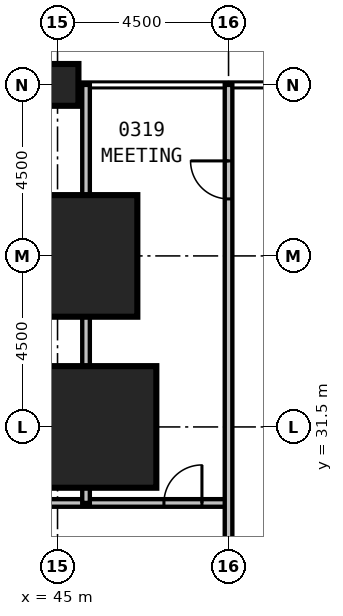
"""IFC4 building model, lengths in metres.
Left out: names, types, materials, properties, quantities, classifications, styles, units other than length and angle.
Written with IfcOpenShell. Run it as: python <this file> out.ifc"""

import sys

from ifc_helpers import new_model, si_unit, direction, frame, frame_2d, origin, origin_2d, place, context, subcontext, project, spatial, rectangle, extrude, element, fill, save


model = new_model("IFC4")
c1 = context("Model", 3, precision=1e-05, world=origin(), true_north=direction((0.0, 1.0)))
c2 = subcontext(c1, "Body", "Model", "MODEL_VIEW")
j1 = project(units=[si_unit("LENGTHUNIT", "METRE"), si_unit("PLANEANGLEUNIT", "RADIAN")], contexts=[c1])
p1 = place(None, origin())
s1 = spatial("IfcSite", under=j1, at=p1, CompositionType="ELEMENT")
p2 = place(p1, origin())
s2 = spatial("IfcBuilding", under=s1, at=p2, CompositionType="ELEMENT")
p3 = place(p2, frame((0.0, 0.0, 19.0)))
s3 = spatial("IfcBuildingStorey", under=s2, at=p3, CompositionType="ELEMENT", Elevation=19.0)
for number, where, z_axis, x_axis in (
    (1, (46.0, 31.5, 0.0), (0.0, 0.0, 1.0), (1.0, 0.0, 0.0)),
    (2, (45.5, 36.0, 0.0), (0.0, 0.0, 1.0), (1.0, 0.0, 0.0)),
):
    element("IfcColumn", number, at=place(p3, frame(where, z_axis=z_axis, x_axis=x_axis)), inside=s3, PredefinedType="COLUMN", context=c2, shape_type="SweptSolid", body=[
        extrude(rectangle(XDim=3.2, YDim=3.2, at=origin_2d()), origin(), (0.0, 0.0, 1.0), 5.0),
    ])
p4 = place(p3, frame((45.0, 40.5, 0.0), z_axis=(0.0, 0.0, 1.0), x_axis=(1.0, 0.0, 0.0)))
e3 = element("IfcColumn", 3, at=p4, inside=s3, PredefinedType="COLUMN", context=c2, shape_type="SweptSolid", body=[
    extrude(rectangle(XDim=1.1, YDim=1.1, at=origin_2d()), origin(), (0.0, 0.0, 1.0), 5.0),
])
p5 = place(p3, frame((49.5, 10.4, 0.0), z_axis=(0.0, 0.0, 1.0), x_axis=(0.0, 1.0, 0.0)))
e4 = element("IfcWall", 4, at=p5, inside=s3, PredefinedType="PARTITIONING", context=c2, shape_type="SweptSolid", body=[
    extrude(rectangle(XDim=30.1, YDim=0.2, at=frame_2d((15.05, 0.0))), origin(), (0.0, 0.0, 1.0), 4.7),
])
p6 = place(p5, frame((27.1, 0.0, 0.0)))
e5 = element("IfcOpeningElement", 5, at=p6, cuts=e4, PredefinedType="OPENING", context=c2, shape_type="SweptSolid", body=[
    extrude(rectangle(XDim=1.0, YDim=2.1, at=frame_2d((0.5, 1.05))), frame((0.0, 0.11, 0.0), z_axis=(0.0, -1.0, 0.0), x_axis=(1.0, 0.0, 0.0)), (0.0, 0.0, 1.0), 0.22),
])
p7 = place(p5, frame((4.8, 0.0, 0.0)))
e6 = element("IfcOpeningElement", 6, at=p7, cuts=e4, PredefinedType="OPENING", context=c2, shape_type="SweptSolid", body=[
    extrude(rectangle(XDim=1.2, YDim=2.1, at=frame_2d((0.6, 1.05))), frame((0.0, 0.11, 0.0), z_axis=(0.0, -1.0, 0.0), x_axis=(1.0, 0.0, 0.0)), (0.0, 0.0, 1.0), 0.22),
])
p8 = place(p3, frame((42.2, 29.5, 0.0), z_axis=(0.0, 0.0, 1.0), x_axis=(1.0, 0.0, 0.0)))
e7 = element("IfcWall", 7, at=p8, inside=s3, PredefinedType="PARTITIONING", context=c2, shape_type="SweptSolid", body=[
    extrude(rectangle(XDim=7.3, YDim=0.2, at=frame_2d((3.65, 0.0))), origin(), (0.0, 0.0, 1.0), 4.7),
])
p9 = place(p8, frame((0.5, 0.0, 0.0)))
e8 = element("IfcOpeningElement", 8, at=p9, cuts=e7, PredefinedType="OPENING", context=c2, shape_type="SweptSolid", body=[
    extrude(rectangle(XDim=1.0, YDim=2.1, at=frame_2d((0.5, 1.05))), frame((0.0, 0.11, 0.0), z_axis=(0.0, -1.0, 0.0), x_axis=(1.0, 0.0, 0.0)), (0.0, 0.0, 1.0), 0.22),
])
p10 = place(p8, frame((5.6, 0.0, 0.0)))
e9 = element("IfcOpeningElement", 9, at=p10, cuts=e7, PredefinedType="OPENING", context=c2, shape_type="SweptSolid", body=[
    extrude(rectangle(XDim=1.0, YDim=2.1, at=frame_2d((0.5, 1.05))), frame((0.0, 0.11, 0.0), z_axis=(0.0, -1.0, 0.0), x_axis=(1.0, 0.0, 0.0)), (0.0, 0.0, 1.0), 0.22),
])
p11 = place(p3, frame((45.75, 29.5, 0.0), z_axis=(0.0, 0.0, 1.0), x_axis=(0.0, 1.0, 0.0)))
e10 = element("IfcWall", 10, at=p11, inside=s3, PredefinedType="PARTITIONING", context=c2, shape_type="SweptSolid", body=[
    extrude(rectangle(XDim=0.4, YDim=0.2, at=frame_2d((0.2, 0.0))), origin(), (0.0, 0.0, 1.0), 4.7),
])
p12 = place(p3, frame((45.75, 33.1, 0.0), z_axis=(0.0, 0.0, 1.0), x_axis=(0.0, 1.0, 0.0)))
e11 = element("IfcWall", 11, at=p12, inside=s3, PredefinedType="PARTITIONING", context=c2, shape_type="SweptSolid", body=[
    extrude(rectangle(XDim=1.3, YDim=0.2, at=frame_2d((0.65, 0.0))), origin(), (0.0, 0.0, 1.0), 3.4),
])
p13 = place(p3, frame((45.75, 37.6, 0.0), z_axis=(0.0, 0.0, 1.0), x_axis=(0.0, 1.0, 0.0)))
e12 = element("IfcWall", 12, at=p13, inside=s3, PredefinedType="PARTITIONING", context=c2, shape_type="SweptSolid", body=[
    extrude(rectangle(XDim=2.9, YDim=0.2, at=frame_2d((1.45, 0.0))), origin(), (0.0, 0.0, 1.0), 4.7),
])
p14 = place(p6, origin())
e13 = element("IfcDoor", 13, at=p14, inside=s3, OperationType="SINGLE_SWING_RIGHT", PredefinedType="DOOR", context=c2, shape_type="SweptSolid", body=[
    extrude(rectangle(XDim=1.0, YDim=2.1, at=frame_2d((0.5, 1.05))), frame((0.0, 0.025, 0.0), z_axis=(0.0, -1.0, 0.0), x_axis=(1.0, 0.0, 0.0)), (0.0, 0.0, 1.0), 0.05),
])
fill(e5, e13)
p15 = place(p10, origin())
e14 = element("IfcDoor", 14, at=p15, inside=s3, OperationType="SINGLE_SWING_RIGHT", PredefinedType="DOOR", context=c2, shape_type="SweptSolid", body=[
    extrude(rectangle(XDim=1.0, YDim=2.1, at=frame_2d((0.5, 1.05))), frame((0.0, 0.025, 0.0), z_axis=(0.0, -1.0, 0.0), x_axis=(1.0, 0.0, 0.0)), (0.0, 0.0, 1.0), 0.05),
])
fill(e9, e14)
save(model, sys.argv[1])
